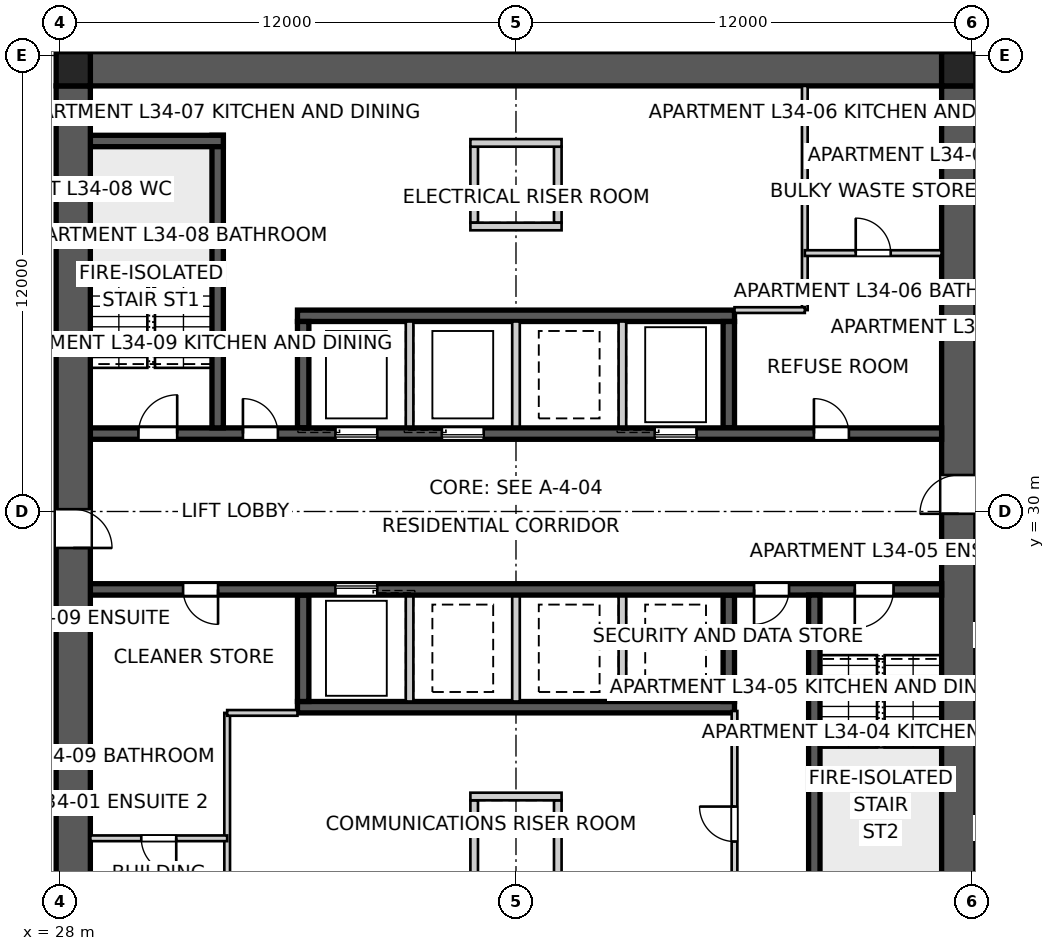
"""IFC4 building model, lengths in metres.
Left out: names, types, materials, properties, quantities, classifications, styles, units other than length and angle.
Written with IfcOpenShell. Run it as: python <this file> out.ifc"""

import sys

from ifc_helpers import new_model, si_unit, direction, frame, frame_2d, origin, origin_2d, place, context, subcontext, project, spatial, polyline, rectangle, outline, extrude, element, fill, save


model = new_model("IFC4")
c1 = context("Model", 3, precision=1e-05, world=origin(), true_north=direction((0.0, 1.0)))
c2 = subcontext(c1, "Body", "Model", "MODEL_VIEW")
j1 = project(units=[si_unit("LENGTHUNIT", "METRE"), si_unit("PLANEANGLEUNIT", "RADIAN")], contexts=[c1])
p1 = place(None, origin())
s1 = spatial("IfcSite", under=j1, at=p1, CompositionType="ELEMENT")
p2 = place(p1, origin())
s2 = spatial("IfcBuilding", under=s1, at=p2, CompositionType="ELEMENT")
p3 = place(p2, frame((0.0, 0.0, 125.2)))
s3 = spatial("IfcBuildingStorey", under=s2, at=p3, CompositionType="ELEMENT", Elevation=125.2)
p4 = place(p3, frame((28.8, 41.65, 0.0), z_axis=(0.0, 0.0, 1.0), x_axis=(1.0, 0.0, 0.0)))
e1 = element("IfcWall", 1, at=p4, inside=s3, PredefinedType="SHEAR", context=c2, shape_type="SweptSolid", body=[
    extrude(outline(polyline([(0.0, -0.45), (22.4, -0.45), (22.4, -0.025), (22.85, -0.025), (22.85, 0.025), (22.4, 0.025), (22.4, 0.45), (0.0, 0.45), (0.0, 0.025), (-0.45, 0.025), (-0.45, -0.025), (0.0, -0.025), (0.0, -0.45)])), origin(), (0.0, 0.0, 1.0), 3.4),
])
p5 = place(p3, frame((51.65, 18.8, 0.0), z_axis=(0.0, 0.0, 1.0), x_axis=(0.0, 1.0, 0.0)))
e2 = element("IfcWall", 2, at=p5, inside=s3, PredefinedType="SHEAR", context=c2, shape_type="SweptSolid", body=[
    extrude(outline(polyline([(0.0, -0.45), (22.4, -0.45), (22.4, -0.025), (22.85, -0.025), (22.85, 0.025), (22.4, 0.025), (22.4, 0.45), (0.0, 0.45), (0.0, 0.025), (-0.45, 0.025), (-0.45, -0.025), (0.0, -0.025), (0.0, -0.45)])), origin(), (0.0, 0.0, 1.0), 3.4),
])
p6 = place(p5, frame((11.14, 0.0, 0.0)))
e3 = element("IfcOpeningElement", 3, at=p6, cuts=e2, PredefinedType="OPENING", context=c2, shape_type="SweptSolid", body=[
    extrude(rectangle(XDim=1.02, YDim=2.4, at=frame_2d((0.51, 1.2))), frame((0.0, 0.46, 0.0), z_axis=(0.0, -1.0, 0.0), x_axis=(1.0, 0.0, 0.0)), (0.0, 0.0, 1.0), 0.92),
])
p7 = place(p3, frame((28.35, 41.2, 0.0), z_axis=(0.0, 0.0, 1.0), x_axis=(0.0, -1.0, 0.0)))
e4 = element("IfcWall", 4, at=p7, inside=s3, PredefinedType="SHEAR", context=c2, shape_type="SweptSolid", body=[
    extrude(outline(polyline([(0.0, -0.45), (22.4, -0.45), (22.4, -0.025), (22.85, -0.025), (22.85, 0.025), (22.4, 0.025), (22.4, 0.45), (0.0, 0.45), (0.0, 0.025), (-0.45, 0.025), (-0.45, -0.025), (0.0, -0.025), (0.0, -0.45)])), origin(), (0.0, 0.0, 1.0), 3.4),
])
p8 = place(p7, frame((11.14, 0.0, 0.0)))
e5 = element("IfcOpeningElement", 5, at=p8, cuts=e4, PredefinedType="OPENING", context=c2, shape_type="SweptSolid", body=[
    extrude(rectangle(XDim=1.02, YDim=2.4, at=frame_2d((0.51, 1.2))), frame((0.0, 0.46, 0.0), z_axis=(0.0, -1.0, 0.0), x_axis=(1.0, 0.0, 0.0)), (0.0, 0.0, 1.0), 0.92),
])
p9 = place(p3, frame((28.8, 32.05, 0.0), z_axis=(0.0, 0.0, 1.0), x_axis=(1.0, 0.0, 0.0)))
e6 = element("IfcWall", 6, at=p9, inside=s3, PredefinedType="SHEAR", context=c2, shape_type="SweptSolid", body=[
    extrude(rectangle(XDim=22.4, YDim=0.3, at=frame_2d((11.2, 0.0))), origin(), (0.0, 0.0, 1.0), 3.4),
])
p10 = place(p9, frame((19.04, 0.0, 0.0)))
e7 = element("IfcOpeningElement", 7, at=p10, cuts=e6, PredefinedType="OPENING", context=c2, shape_type="SweptSolid", body=[
    extrude(rectangle(XDim=0.92, YDim=2.1, at=frame_2d((0.46, 1.05))), frame((0.0, 0.16, 0.0), z_axis=(0.0, -1.0, 0.0), x_axis=(1.0, 0.0, 0.0)), (0.0, 0.0, 1.0), 0.32),
])
p11 = place(p9, frame((1.265, 0.0, 0.0)))
e8 = element("IfcOpeningElement", 8, at=p11, cuts=e6, PredefinedType="OPENING", context=c2, shape_type="SweptSolid", body=[
    extrude(rectangle(XDim=1.02, YDim=2.1, at=frame_2d((0.51, 1.05))), frame((0.0, 0.16, 0.0), z_axis=(0.0, -1.0, 0.0), x_axis=(1.0, 0.0, 0.0)), (0.0, 0.0, 1.0), 0.32),
])
p12 = place(p9, frame((4.015, 0.0, 0.0)))
e9 = element("IfcOpeningElement", 9, at=p12, cuts=e6, PredefinedType="OPENING", context=c2, shape_type="SweptSolid", body=[
    extrude(rectangle(XDim=0.92, YDim=2.1, at=frame_2d((0.46, 1.05))), frame((0.0, 0.16, 0.0), z_axis=(0.0, -1.0, 0.0), x_axis=(1.0, 0.0, 0.0)), (0.0, 0.0, 1.0), 0.32),
])
p13 = place(p9, frame((6.45, 0.0, 0.0)))
e10 = element("IfcOpeningElement", 10, at=p13, cuts=e6, PredefinedType="OPENING", context=c2, shape_type="SweptSolid", body=[
    extrude(rectangle(XDim=1.1, YDim=2.1, at=frame_2d((0.55, 1.05))), frame((0.0, 0.16, 0.0), z_axis=(0.0, -1.0, 0.0), x_axis=(1.0, 0.0, 0.0)), (0.0, 0.0, 1.0), 0.32),
])
p14 = place(p9, frame((9.25, 0.0, 0.0)))
e11 = element("IfcOpeningElement", 11, at=p14, cuts=e6, PredefinedType="OPENING", context=c2, shape_type="SweptSolid", body=[
    extrude(rectangle(XDim=1.1, YDim=2.1, at=frame_2d((0.55, 1.05))), frame((0.0, 0.16, 0.0), z_axis=(0.0, -1.0, 0.0), x_axis=(1.0, 0.0, 0.0)), (0.0, 0.0, 1.0), 0.32),
])
p15 = place(p9, frame((14.85, 0.0, 0.0)))
e12 = element("IfcOpeningElement", 12, at=p15, cuts=e6, PredefinedType="OPENING", context=c2, shape_type="SweptSolid", body=[
    extrude(rectangle(XDim=1.1, YDim=2.1, at=frame_2d((0.55, 1.05))), frame((0.0, 0.16, 0.0), z_axis=(0.0, -1.0, 0.0), x_axis=(1.0, 0.0, 0.0)), (0.0, 0.0, 1.0), 0.32),
])
p16 = place(p3, frame((51.2, 27.95, 0.0), z_axis=(0.0, 0.0, 1.0), x_axis=(-1.0, 0.0, 0.0)))
e13 = element("IfcWall", 13, at=p16, inside=s3, PredefinedType="SHEAR", context=c2, shape_type="SweptSolid", body=[
    extrude(rectangle(XDim=22.4, YDim=0.3, at=frame_2d((11.2, 0.0))), origin(), (0.0, 0.0, 1.0), 3.4),
])
p17 = place(p16, frame((19.04, 0.0, 0.0)))
e14 = element("IfcOpeningElement", 14, at=p17, cuts=e13, PredefinedType="OPENING", context=c2, shape_type="SweptSolid", body=[
    extrude(rectangle(XDim=0.92, YDim=2.1, at=frame_2d((0.46, 1.05))), frame((0.0, 0.16, 0.0), z_axis=(0.0, -1.0, 0.0), x_axis=(1.0, 0.0, 0.0)), (0.0, 0.0, 1.0), 0.32),
])
p18 = place(p16, frame((1.265, 0.0, 0.0)))
e15 = element("IfcOpeningElement", 15, at=p18, cuts=e13, PredefinedType="OPENING", context=c2, shape_type="SweptSolid", body=[
    extrude(rectangle(XDim=1.02, YDim=2.1, at=frame_2d((0.51, 1.05))), frame((0.0, 0.16, 0.0), z_axis=(0.0, -1.0, 0.0), x_axis=(1.0, 0.0, 0.0)), (0.0, 0.0, 1.0), 0.32),
])
p19 = place(p16, frame((4.015, 0.0, 0.0)))
e16 = element("IfcOpeningElement", 16, at=p19, cuts=e13, PredefinedType="OPENING", context=c2, shape_type="SweptSolid", body=[
    extrude(rectangle(XDim=0.92, YDim=2.1, at=frame_2d((0.46, 1.05))), frame((0.0, 0.16, 0.0), z_axis=(0.0, -1.0, 0.0), x_axis=(1.0, 0.0, 0.0)), (0.0, 0.0, 1.0), 0.32),
])
p20 = place(p16, frame((14.85, 0.0, 0.0)))
e17 = element("IfcOpeningElement", 17, at=p20, cuts=e13, PredefinedType="OPENING", context=c2, shape_type="SweptSolid", body=[
    extrude(rectangle(XDim=1.1, YDim=2.1, at=frame_2d((0.55, 1.05))), frame((0.0, 0.16, 0.0), z_axis=(0.0, -1.0, 0.0), x_axis=(1.0, 0.0, 0.0)), (0.0, 0.0, 1.0), 0.32),
])
for number, where, z_axis, x_axis in (
    (18, (34.25, 35.15, 0.0), (0.0, 0.0, 1.0), (1.0, 0.0, 0.0)),
    (19, (45.75, 24.85, 0.0), (0.0, 0.0, 1.0), (-1.0, 0.0, 0.0)),
):
    element("IfcWall", number, at=place(p3, frame(where, z_axis=z_axis, x_axis=x_axis)), inside=s3, PredefinedType="SHEAR", context=c2, shape_type="SweptSolid", body=[
        extrude(rectangle(XDim=11.5, YDim=0.3, at=frame_2d((5.75, 0.0))), origin(), (0.0, 0.0, 1.0), 3.4),
    ])
for number, where, z_axis, x_axis in (
    (20, (34.4, 32.2, 0.0), (0.0, 0.0, 1.0), (0.0, 1.0, 0.0)),
    (21, (45.6, 27.8, 0.0), (0.0, 0.0, 1.0), (0.0, -1.0, 0.0)),
):
    element("IfcWall", number, at=place(p3, frame(where, z_axis=z_axis, x_axis=x_axis)), inside=s3, PredefinedType="SHEAR", context=c2, shape_type="SweptSolid", body=[
        extrude(rectangle(XDim=2.8, YDim=0.3, at=frame_2d((1.4, 0.0))), origin(), (0.0, 0.0, 1.0), 3.4),
    ])
for number, where, z_axis, x_axis in (
    (22, (37.2, 32.2, 0.0), (0.0, 0.0, 1.0), (0.0, 1.0, 0.0)),
    (23, (42.8, 27.8, 0.0), (0.0, 0.0, 1.0), (0.0, -1.0, 0.0)),
    (24, (40.0, 32.2, 0.0), (0.0, 0.0, 1.0), (0.0, 1.0, 0.0)),
    (25, (40.0, 27.8, 0.0), (0.0, 0.0, 1.0), (0.0, -1.0, 0.0)),
    (26, (42.8, 32.2, 0.0), (0.0, 0.0, 1.0), (0.0, 1.0, 0.0)),
    (27, (37.2, 27.8, 0.0), (0.0, 0.0, 1.0), (0.0, -1.0, 0.0)),
):
    element("IfcWall", number, at=place(p3, frame(where, z_axis=z_axis, x_axis=x_axis)), inside=s3, PredefinedType="SOLIDWALL", context=c2, shape_type="SweptSolid", body=[
        extrude(rectangle(XDim=2.8, YDim=0.2, at=frame_2d((1.4, 0.0))), origin(), (0.0, 0.0, 1.0), 3.4),
    ])
for number, where, z_axis, x_axis in (
    (28, (45.6, 32.2, 0.0), (0.0, 0.0, 1.0), (0.0, 1.0, 0.0)),
    (29, (34.4, 27.8, 0.0), (0.0, 0.0, 1.0), (0.0, -1.0, 0.0)),
):
    element("IfcWall", number, at=place(p3, frame(where, z_axis=z_axis, x_axis=x_axis)), inside=s3, PredefinedType="SHEAR", context=c2, shape_type="SweptSolid", body=[
        extrude(rectangle(XDim=2.8, YDim=0.3, at=frame_2d((1.4, 0.0))), origin(), (0.0, 0.0, 1.0), 3.4),
    ])
p21 = place(p3, frame((32.15, 32.2, 0.0), z_axis=(0.0, 0.0, 1.0), x_axis=(0.0, 1.0, 0.0)))
e30 = element("IfcWall", 30, at=p21, inside=s3, PredefinedType="SHEAR", context=c2, shape_type="SweptSolid", body=[
    extrude(rectangle(XDim=7.7, YDim=0.3, at=frame_2d((3.85, 0.0))), origin(), (0.0, 0.0, 1.0), 3.4),
])
p22 = place(p3, frame((28.8, 39.75, 0.0), z_axis=(0.0, 0.0, 1.0), x_axis=(1.0, 0.0, 0.0)))
e31 = element("IfcWall", 31, at=p22, inside=s3, PredefinedType="SHEAR", context=c2, shape_type="SweptSolid", body=[
    extrude(rectangle(XDim=3.5, YDim=0.3, at=frame_2d((1.75, 0.0))), origin(), (0.0, 0.0, 1.0), 3.4),
])
p23 = place(p3, frame((47.85, 27.8, 0.0), z_axis=(0.0, 0.0, 1.0), x_axis=(0.0, -1.0, 0.0)))
e32 = element("IfcWall", 32, at=p23, inside=s3, PredefinedType="SHEAR", context=c2, shape_type="SweptSolid", body=[
    extrude(rectangle(XDim=7.7, YDim=0.3, at=frame_2d((3.85, 0.0))), origin(), (0.0, 0.0, 1.0), 3.4),
])
for number, where, z_axis, x_axis in (
    (33, (38.9, 37.6, 0.0), (0.0, 0.0, 1.0), (0.0, 1.0, 0.0)),
    (34, (41.1, 37.6, 0.0), (0.0, 0.0, 1.0), (0.0, 1.0, 0.0)),
):
    element("IfcWall", number, at=place(p3, frame(where, z_axis=z_axis, x_axis=x_axis)), inside=s3, PredefinedType="SOLIDWALL", context=c2, shape_type="SweptSolid", body=[
        extrude(rectangle(XDim=2.0, YDim=0.2, at=frame_2d((1.0, 0.0))), origin(), (0.0, 0.0, 1.0), 3.4),
    ])
for number, where, z_axis, x_axis in (
    (35, (38.8, 37.5, 0.0), (0.0, 0.0, 1.0), (1.0, 0.0, 0.0)),
    (36, (38.8, 39.7, 0.0), (0.0, 0.0, 1.0), (1.0, 0.0, 0.0)),
):
    element("IfcWall", number, at=place(p3, frame(where, z_axis=z_axis, x_axis=x_axis)), inside=s3, PredefinedType="SOLIDWALL", context=c2, shape_type="SweptSolid", body=[
        extrude(rectangle(XDim=2.4, YDim=0.2, at=frame_2d((1.2, 0.0))), origin(), (0.0, 0.0, 1.0), 3.4),
    ])
for number, where, z_axis, x_axis in (
    (37, (38.9, 22.4, 0.0), (0.0, 0.0, 1.0), (0.0, -1.0, 0.0)),
    (38, (41.1, 22.4, 0.0), (0.0, 0.0, 1.0), (0.0, -1.0, 0.0)),
):
    element("IfcWall", number, at=place(p3, frame(where, z_axis=z_axis, x_axis=x_axis)), inside=s3, PredefinedType="SOLIDWALL", context=c2, shape_type="SweptSolid", body=[
        extrude(rectangle(XDim=2.0, YDim=0.2, at=frame_2d((1.0, 0.0))), origin(), (0.0, 0.0, 1.0), 3.4),
    ])
p24 = place(p3, frame((38.8, 22.5, 0.0), z_axis=(0.0, 0.0, 1.0), x_axis=(1.0, 0.0, 0.0)))
e39 = element("IfcWall", 39, at=p24, inside=s3, PredefinedType="SOLIDWALL", context=c2, shape_type="SweptSolid", body=[
    extrude(rectangle(XDim=2.4, YDim=0.2, at=frame_2d((1.2, 0.0))), origin(), (0.0, 0.0, 1.0), 3.4),
])
for number, where, z_axis, x_axis in (
    (40, (51.65, 41.65, 0.0), (0.0, 0.0, 1.0), (1.0, 0.0, 0.0)),
    (41, (28.35, 41.65, 0.0), (0.0, 0.0, 1.0), (1.0, 0.0, 0.0)),
):
    element("IfcColumn", number, at=place(p3, frame(where, z_axis=z_axis, x_axis=x_axis)), inside=s3, PredefinedType="COLUMN", context=c2, shape_type="SweptSolid", body=[
        extrude(rectangle(XDim=0.9, YDim=0.9, at=origin_2d()), origin(), (0.0, 0.0, 1.0), 3.4),
    ])
p25 = place(p3, frame((47.6, 41.2, 0.0), z_axis=(0.0, 0.0, 1.0), x_axis=(0.0, -1.0, 0.0)))
e42 = element("IfcWall", 42, at=p25, inside=s3, PredefinedType="SOLIDWALL", context=c2, shape_type="SweptSolid", body=[
    extrude(rectangle(XDim=5.9, YDim=0.15, at=frame_2d((2.95, 0.0))), origin(), (0.0, 0.0, 1.0), 3.25),
])
p26 = place(p3, frame((47.6, 35.3, 0.0), z_axis=(0.0, 0.0, 1.0), x_axis=(-1.0, 0.0, 0.0)))
e43 = element("IfcWall", 43, at=p26, inside=s3, PredefinedType="SOLIDWALL", context=c2, shape_type="SweptSolid", body=[
    extrude(rectangle(XDim=1.85, YDim=0.15, at=frame_2d((0.925, 0.0))), origin(), (0.0, 0.0, 1.0), 3.25),
])
p27 = place(p3, frame((47.6, 36.8, 0.0), z_axis=(0.0, 0.0, 1.0), x_axis=(1.0, 0.0, 0.0)))
e44 = element("IfcWall", 44, at=p27, inside=s3, PredefinedType="SOLIDWALL", context=c2, shape_type="SweptSolid", body=[
    extrude(rectangle(XDim=3.6, YDim=0.15, at=frame_2d((1.8, 0.0))), origin(), (0.0, 0.0, 1.0), 3.25),
])
p28 = place(p27, frame((1.34, 0.0, 0.0)))
e45 = element("IfcOpeningElement", 45, at=p28, cuts=e44, PredefinedType="OPENING", context=c2, shape_type="SweptSolid", body=[
    extrude(rectangle(XDim=0.92, YDim=2.1, at=frame_2d((0.46, 1.05))), frame((0.0, 0.085, 0.0), z_axis=(0.0, -1.0, 0.0), x_axis=(1.0, 0.0, 0.0)), (0.0, 0.0, 1.0), 0.17),
])
p29 = place(p3, frame((45.75, 18.8, 0.0), z_axis=(0.0, 0.0, 1.0), x_axis=(0.0, 1.0, 0.0)))
e46 = element("IfcWall", 46, at=p29, inside=s3, PredefinedType="SOLIDWALL", context=c2, shape_type="SweptSolid", body=[
    extrude(rectangle(XDim=5.95, YDim=0.15, at=frame_2d((2.975, 0.0))), origin(), (0.0, 0.0, 1.0), 3.25),
])
p30 = place(p29, frame((2.515, 0.0, 0.0)))
e47 = element("IfcOpeningElement", 47, at=p30, cuts=e46, PredefinedType="OPENING", context=c2, shape_type="SweptSolid", body=[
    extrude(rectangle(XDim=0.92, YDim=2.1, at=frame_2d((0.46, 1.05))), frame((0.0, 0.085, 0.0), z_axis=(0.0, -1.0, 0.0), x_axis=(1.0, 0.0, 0.0)), (0.0, 0.0, 1.0), 0.17),
])
p31 = place(p3, frame((32.4, 18.8, 0.0), z_axis=(0.0, 0.0, 1.0), x_axis=(0.0, 1.0, 0.0)))
e48 = element("IfcWall", 48, at=p31, inside=s3, PredefinedType="SOLIDWALL", context=c2, shape_type="SweptSolid", body=[
    extrude(rectangle(XDim=5.9, YDim=0.15, at=frame_2d((2.95, 0.0))), origin(), (0.0, 0.0, 1.0), 3.25),
])
p32 = place(p3, frame((32.4, 24.7, 0.0), z_axis=(0.0, 0.0, 1.0), x_axis=(1.0, 0.0, 0.0)))
e49 = element("IfcWall", 49, at=p32, inside=s3, PredefinedType="SOLIDWALL", context=c2, shape_type="SweptSolid", body=[
    extrude(rectangle(XDim=1.85, YDim=0.15, at=frame_2d((0.925, 0.0))), origin(), (0.0, 0.0, 1.0), 3.25),
])
p33 = place(p3, frame((32.4, 21.4, 0.0), z_axis=(0.0, 0.0, 1.0), x_axis=(-1.0, 0.0, 0.0)))
e50 = element("IfcWall", 50, at=p33, inside=s3, PredefinedType="SOLIDWALL", context=c2, shape_type="SweptSolid", body=[
    extrude(rectangle(XDim=3.6, YDim=0.15, at=frame_2d((1.8, 0.0))), origin(), (0.0, 0.0, 1.0), 3.25),
])
p34 = place(p33, frame((1.34, 0.0, 0.0)))
e51 = element("IfcOpeningElement", 51, at=p34, cuts=e50, PredefinedType="OPENING", context=c2, shape_type="SweptSolid", body=[
    extrude(rectangle(XDim=0.92, YDim=2.1, at=frame_2d((0.46, 1.05))), frame((0.0, 0.085, 0.0), z_axis=(0.0, -1.0, 0.0), x_axis=(1.0, 0.0, 0.0)), (0.0, 0.0, 1.0), 0.17),
])
p35 = place(p10, origin())
e52 = element("IfcDoor", 52, at=p35, inside=s3, OperationType="SINGLE_SWING_LEFT", PredefinedType="DOOR", context=c2, shape_type="SweptSolid", body=[
    extrude(rectangle(XDim=0.92, YDim=2.1, at=frame_2d((0.46, 1.05))), frame((0.0, 0.025, 0.0), z_axis=(0.0, -1.0, 0.0), x_axis=(1.0, 0.0, 0.0)), (0.0, 0.0, 1.0), 0.05),
])
fill(e7, e52)
p36 = place(p17, origin())
e53 = element("IfcDoor", 53, at=p36, inside=s3, OperationType="SINGLE_SWING_LEFT", PredefinedType="DOOR", context=c2, shape_type="SweptSolid", body=[
    extrude(rectangle(XDim=0.92, YDim=2.1, at=frame_2d((0.46, 1.05))), frame((0.0, 0.025, 0.0), z_axis=(0.0, -1.0, 0.0), x_axis=(1.0, 0.0, 0.0)), (0.0, 0.0, 1.0), 0.05),
])
fill(e14, e53)
p37 = place(p18, origin())
e54 = element("IfcDoor", 54, at=p37, inside=s3, OperationType="SINGLE_SWING_RIGHT", PredefinedType="DOOR", context=c2, shape_type="SweptSolid", body=[
    extrude(rectangle(XDim=1.02, YDim=2.1, at=frame_2d((0.51, 1.05))), frame((0.0, 0.025, 0.0), z_axis=(0.0, -1.0, 0.0), x_axis=(1.0, 0.0, 0.0)), (0.0, 0.0, 1.0), 0.05),
])
fill(e15, e54)
p38 = place(p11, origin())
e55 = element("IfcDoor", 55, at=p38, inside=s3, OperationType="SINGLE_SWING_RIGHT", PredefinedType="DOOR", context=c2, shape_type="SweptSolid", body=[
    extrude(rectangle(XDim=1.02, YDim=2.1, at=frame_2d((0.51, 1.05))), frame((0.0, 0.025, 0.0), z_axis=(0.0, -1.0, 0.0), x_axis=(1.0, 0.0, 0.0)), (0.0, 0.0, 1.0), 0.05),
])
fill(e8, e55)
p39 = place(p12, origin())
e56 = element("IfcDoor", 56, at=p39, inside=s3, OperationType="SINGLE_SWING_LEFT", PredefinedType="DOOR", context=c2, shape_type="SweptSolid", body=[
    extrude(rectangle(XDim=0.92, YDim=2.1, at=frame_2d((0.46, 1.05))), frame((0.0, 0.025, 0.0), z_axis=(0.0, -1.0, 0.0), x_axis=(1.0, 0.0, 0.0)), (0.0, 0.0, 1.0), 0.05),
])
fill(e9, e56)
p40 = place(p19, origin())
e57 = element("IfcDoor", 57, at=p40, inside=s3, OperationType="SINGLE_SWING_RIGHT", PredefinedType="DOOR", context=c2, shape_type="SweptSolid", body=[
    extrude(rectangle(XDim=0.92, YDim=2.1, at=frame_2d((0.46, 1.05))), frame((0.0, 0.025, 0.0), z_axis=(0.0, -1.0, 0.0), x_axis=(1.0, 0.0, 0.0)), (0.0, 0.0, 1.0), 0.05),
])
fill(e16, e57)
p41 = place(p28, origin())
e58 = element("IfcDoor", 58, at=p41, inside=s3, OperationType="SINGLE_SWING_LEFT", PredefinedType="DOOR", context=c2, shape_type="SweptSolid", body=[
    extrude(rectangle(XDim=0.92, YDim=2.1, at=frame_2d((0.46, 1.05))), frame((0.0, 0.025, 0.0), z_axis=(0.0, -1.0, 0.0), x_axis=(1.0, 0.0, 0.0)), (0.0, 0.0, 1.0), 0.05),
])
fill(e45, e58)
p42 = place(p34, origin())
e59 = element("IfcDoor", 59, at=p42, inside=s3, OperationType="SINGLE_SWING_LEFT", PredefinedType="DOOR", context=c2, shape_type="SweptSolid", body=[
    extrude(rectangle(XDim=0.92, YDim=2.1, at=frame_2d((0.46, 1.05))), frame((0.0, 0.025, 0.0), z_axis=(0.0, -1.0, 0.0), x_axis=(1.0, 0.0, 0.0)), (0.0, 0.0, 1.0), 0.05),
])
fill(e51, e59)
p43 = place(p30, origin())
e60 = element("IfcDoor", 60, at=p43, inside=s3, OperationType="SINGLE_SWING_RIGHT", PredefinedType="DOOR", context=c2, shape_type="SweptSolid", body=[
    extrude(rectangle(XDim=0.92, YDim=2.1, at=frame_2d((0.46, 1.05))), frame((0.0, 0.025, 0.0), z_axis=(0.0, -1.0, 0.0), x_axis=(1.0, 0.0, 0.0)), (0.0, 0.0, 1.0), 0.05),
])
fill(e47, e60)
p44 = place(p6, origin())
e61 = element("IfcDoor", 61, at=p44, inside=s3, OperationType="SINGLE_SWING_LEFT", PredefinedType="DOOR", context=c2, shape_type="SweptSolid", body=[
    extrude(rectangle(XDim=1.02, YDim=2.4, at=frame_2d((0.51, 1.2))), frame((0.0, 0.025, 0.0), z_axis=(0.0, -1.0, 0.0), x_axis=(1.0, 0.0, 0.0)), (0.0, 0.0, 1.0), 0.05),
])
fill(e3, e61)
p45 = place(p8, origin())
e62 = element("IfcDoor", 62, at=p45, inside=s3, OperationType="SINGLE_SWING_RIGHT", PredefinedType="DOOR", context=c2, shape_type="SweptSolid", body=[
    extrude(rectangle(XDim=1.02, YDim=2.4, at=frame_2d((0.51, 1.2))), frame((0.0, 0.025, 0.0), z_axis=(0.0, -1.0, 0.0), x_axis=(1.0, 0.0, 0.0)), (0.0, 0.0, 1.0), 0.05),
])
fill(e5, e62)
p46 = place(p13, origin())
e63 = element("IfcDoor", 63, at=p46, inside=s3, OperationType="SLIDING_TO_LEFT", PredefinedType="DOOR", context=c2, shape_type="SweptSolid", body=[
    extrude(rectangle(XDim=1.1, YDim=2.1, at=frame_2d((0.55, 1.05))), frame((0.0, 0.025, 0.0), z_axis=(0.0, -1.0, 0.0), x_axis=(1.0, 0.0, 0.0)), (0.0, 0.0, 1.0), 0.05),
])
fill(e10, e63)
p47 = place(p14, origin())
e64 = element("IfcDoor", 64, at=p47, inside=s3, OperationType="SLIDING_TO_LEFT", PredefinedType="DOOR", context=c2, shape_type="SweptSolid", body=[
    extrude(rectangle(XDim=1.1, YDim=2.1, at=frame_2d((0.55, 1.05))), frame((0.0, 0.025, 0.0), z_axis=(0.0, -1.0, 0.0), x_axis=(1.0, 0.0, 0.0)), (0.0, 0.0, 1.0), 0.05),
])
fill(e11, e64)
p48 = place(p15, origin())
e65 = element("IfcDoor", 65, at=p48, inside=s3, OperationType="SLIDING_TO_LEFT", PredefinedType="DOOR", context=c2, shape_type="SweptSolid", body=[
    extrude(rectangle(XDim=1.1, YDim=2.1, at=frame_2d((0.55, 1.05))), frame((0.0, 0.025, 0.0), z_axis=(0.0, -1.0, 0.0), x_axis=(1.0, 0.0, 0.0)), (0.0, 0.0, 1.0), 0.05),
])
fill(e12, e65)
p49 = place(p20, origin())
e66 = element("IfcDoor", 66, at=p49, inside=s3, OperationType="SLIDING_TO_LEFT", PredefinedType="DOOR", context=c2, shape_type="SweptSolid", body=[
    extrude(rectangle(XDim=1.1, YDim=2.1, at=frame_2d((0.55, 1.05))), frame((0.0, 0.025, 0.0), z_axis=(0.0, -1.0, 0.0), x_axis=(1.0, 0.0, 0.0)), (0.0, 0.0, 1.0), 0.05),
])
fill(e17, e66)
save(model, sys.argv[1])
